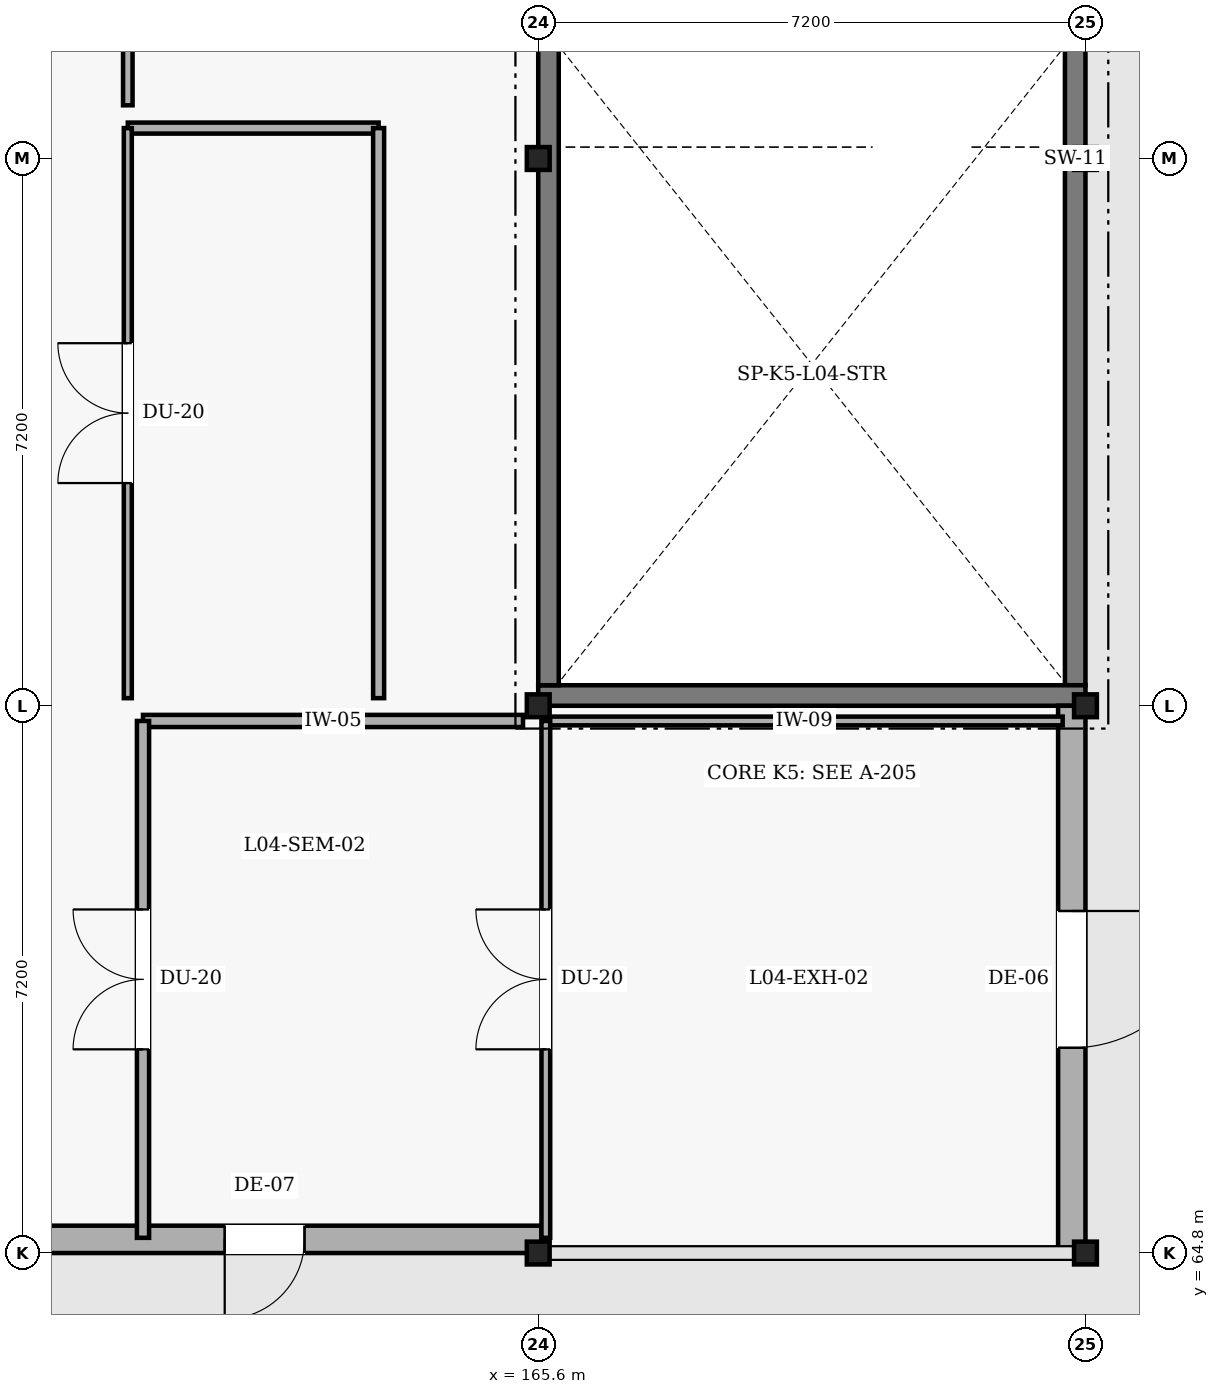
"""IFC4 building model, lengths in metres.
Left out: names, types, materials, properties, quantities, classifications, styles, units other than length and angle.
Written with IfcOpenShell. Run it as: python <this file> out.ifc"""

import sys

from ifc_helpers import new_model, si_unit, direction, frame, frame_2d, origin, origin_2d, place, context, subcontext, project, spatial, rectangle, i_section, extrude, element, fill, save


model = new_model("IFC4")
c1 = context("Model", 3, precision=1e-05, world=origin(), true_north=direction((0.0, 1.0)))
c2 = subcontext(c1, "Body", "Model", "MODEL_VIEW")
j1 = project(units=[si_unit("LENGTHUNIT", "METRE"), si_unit("PLANEANGLEUNIT", "RADIAN")], contexts=[c1])
p1 = place(None, origin())
s1 = spatial("IfcSite", under=j1, at=p1, CompositionType="ELEMENT")
p2 = place(p1, origin())
s2 = spatial("IfcBuilding", under=s1, at=p2, CompositionType="ELEMENT")
p3 = place(p2, frame((0.0, 0.0, 18.0)))
s3 = spatial("IfcBuildingStorey", under=s2, at=p3, CompositionType="ELEMENT", Elevation=18.0)
p4 = place(p3, frame((172.665, 86.13, 0.0), z_axis=(0.0, 0.0, 1.0), x_axis=(0.0, -1.0, 0.0)))
e1 = element("IfcWall", 1, at=p4, inside=s3, PredefinedType="SHEAR", context=c2, shape_type="SweptSolid", body=[
    extrude(rectangle(XDim=13.86, YDim=0.27, at=frame_2d((6.93, 0.0))), origin(), (0.0, 0.0, 1.0), 3.6),
])
p5 = place(p3, frame((172.8, 72.135, 0.0), z_axis=(0.0, 0.0, 1.0), x_axis=(-1.0, 0.0, 0.0)))
e2 = element("IfcWall", 2, at=p5, inside=s3, PredefinedType="SHEAR", context=c2, shape_type="SweptSolid", body=[
    extrude(rectangle(XDim=7.2, YDim=0.27, at=frame_2d((3.6, 0.0))), origin(), (0.0, 0.0, 1.0), 3.6),
])
p6 = place(p3, frame((165.735, 72.27, 0.0), z_axis=(0.0, 0.0, 1.0), x_axis=(0.0, 1.0, 0.0)))
e3 = element("IfcWall", 3, at=p6, inside=s3, PredefinedType="SHEAR", context=c2, shape_type="SweptSolid", body=[
    extrude(rectangle(XDim=13.86, YDim=0.27, at=frame_2d((6.93, 0.0))), origin(), (0.0, 0.0, 1.0), 3.6),
])
p7 = place(p6, frame((9.8, 0.0, 0.0)))
e4 = element("IfcOpeningElement", 4, at=p7, cuts=e3, PredefinedType="OPENING", context=c2, shape_type="SweptSolid", body=[
    extrude(rectangle(XDim=1.25, YDim=2.2, at=frame_2d((0.625, 1.1))), frame((0.0, 0.145, 0.0), z_axis=(0.0, -1.0, 0.0), x_axis=(1.0, 0.0, 0.0)), (0.0, 0.0, 1.0), 0.29),
])
for number, where, z_axis, x_axis in (
    (5, (165.6, 64.8, 0.0), (0.0, 0.0, 1.0), (1.0, 0.0, 0.0)),
    (6, (165.6, 72.0, 0.0), (0.0, 0.0, 1.0), (1.0, 0.0, 0.0)),
    (7, (165.6, 79.2, 0.0), (0.0, 0.0, 1.0), (1.0, 0.0, 0.0)),
    (8, (172.8, 64.8, 0.0), (0.0, 0.0, 1.0), (1.0, 0.0, 0.0)),
    (9, (172.8, 72.0, 0.0), (0.0, 0.0, 1.0), (1.0, 0.0, 0.0)),
    (10, (172.8, 79.2, 0.0), (0.0, 0.0, 1.0), (1.0, 0.0, 0.0)),
):
    element("IfcColumn", number, at=place(p3, frame(where, z_axis=z_axis, x_axis=x_axis)), inside=s3, PredefinedType="COLUMN", context=c2, shape_type="SweptSolid", body=[
        extrude(i_section(OverallWidth=0.3, OverallDepth=0.3, WebThickness=0.011, FlangeThickness=0.019, FilletRadius=0.027, at=origin_2d()), origin(), (0.0, 0.0, 1.0), 3.38),
    ])
p8 = place(p3, frame((172.62, 72.0, 0.0), z_axis=(0.0, 0.0, 1.0), x_axis=(0.0, -1.0, 0.0)))
e11 = element("IfcWall", 11, at=p8, inside=s3, PredefinedType="SOLIDWALL", context=c2, shape_type="SweptSolid", body=[
    extrude(rectangle(XDim=7.2, YDim=0.36, at=frame_2d((3.6, 0.0))), origin(), (0.0, 0.0, 1.0), 3.08),
])
p9 = place(p8, frame((2.7, 0.0, 0.0)))
e12 = element("IfcOpeningElement", 12, at=p9, cuts=e11, PredefinedType="OPENING", context=c2, shape_type="SweptSolid", body=[
    extrude(rectangle(XDim=1.8, YDim=2.25, at=frame_2d((0.9, 1.125))), frame((0.0, 0.19, 0.0), z_axis=(0.0, -1.0, 0.0), x_axis=(1.0, 0.0, 0.0)), (0.0, 0.0, 1.0), 0.38),
])
p10 = place(p3, frame((165.643, 64.98, 0.0), z_axis=(0.0, 0.0, 1.0), x_axis=(-1.0, 0.0, 0.0)))
e13 = element("IfcWall", 13, at=p10, inside=s3, PredefinedType="SOLIDWALL", context=c2, shape_type="SweptSolid", body=[
    extrude(rectangle(XDim=7.243, YDim=0.36, at=frame_2d((3.621, 0.0))), origin(), (0.0, 0.0, 1.0), 2.93),
])
p11 = place(p10, frame((3.117, 0.0, 0.0)))
e14 = element("IfcOpeningElement", 14, at=p11, cuts=e13, PredefinedType="OPENING", context=c2, shape_type="SweptSolid", body=[
    extrude(rectangle(XDim=1.05, YDim=2.2, at=frame_2d((0.525, 1.1))), frame((0.0, 0.19, 0.0), z_axis=(0.0, -1.0, 0.0), x_axis=(1.0, 0.0, 0.0)), (0.0, 0.0, 1.0), 0.38),
])
p12 = place(p3, frame((165.7, 71.8, 0.0), z_axis=(0.0, 0.0, 1.0), x_axis=(1.0, 0.0, 0.0)))
e15 = element("IfcWall", 15, at=p12, inside=s3, PredefinedType="PARTITIONING", context=c2, shape_type="SweptSolid", body=[
    extrude(rectangle(XDim=6.8, YDim=0.115, at=frame_2d((3.4, 0.0))), origin(), (0.0, 0.0, 1.0), 2.93),
])
p13 = place(p3, frame((165.7, 65.0, 0.0), z_axis=(0.0, 0.0, 1.0), x_axis=(0.0, 1.0, 0.0)))
e16 = element("IfcWall", 16, at=p13, inside=s3, PredefinedType="PARTITIONING", context=c2, shape_type="SweptSolid", body=[
    extrude(rectangle(XDim=6.8, YDim=0.115, at=frame_2d((3.4, 0.0))), origin(), (0.0, 0.0, 1.0), 2.98),
])
p14 = place(p13, frame((2.48, 0.0, 0.0)))
e17 = element("IfcOpeningElement", 17, at=p14, cuts=e16, PredefinedType="OPENING", context=c2, shape_type="SweptSolid", body=[
    extrude(rectangle(XDim=1.84, YDim=2.24, at=frame_2d((0.92, 1.12))), frame((0.0, 0.067, 0.0), z_axis=(0.0, -1.0, 0.0), x_axis=(1.0, 0.0, 0.0)), (0.0, 0.0, 1.0), 0.135),
])
p15 = place(p3, frame((160.4, 71.8, 0.0), z_axis=(0.0, 0.0, 1.0), x_axis=(1.0, 0.0, 0.0)))
e18 = element("IfcWall", 18, at=p15, inside=s3, PredefinedType="PARTITIONING", context=c2, shape_type="SweptSolid", body=[
    extrude(rectangle(XDim=5.0, YDim=0.16, at=frame_2d((2.5, 0.0))), origin(), (0.0, 0.0, 1.0), 2.93),
])
p16 = place(p3, frame((160.4, 65.0, 0.0), z_axis=(0.0, 0.0, 1.0), x_axis=(0.0, 1.0, 0.0)))
e19 = element("IfcWall", 19, at=p16, inside=s3, PredefinedType="PARTITIONING", context=c2, shape_type="SweptSolid", body=[
    extrude(rectangle(XDim=6.8, YDim=0.16, at=frame_2d((3.4, 0.0))), origin(), (0.0, 0.0, 1.0), 3.11),
])
p17 = place(p16, frame((2.48, 0.0, 0.0)))
e20 = element("IfcOpeningElement", 20, at=p17, cuts=e19, PredefinedType="OPENING", context=c2, shape_type="SweptSolid", body=[
    extrude(rectangle(XDim=1.84, YDim=2.24, at=frame_2d((0.92, 1.12))), frame((0.0, 0.09, 0.0), z_axis=(0.0, -1.0, 0.0), x_axis=(1.0, 0.0, 0.0)), (0.0, 0.0, 1.0), 0.18),
])
p18 = place(p3, frame((160.2, 79.6, 0.0), z_axis=(0.0, 0.0, 1.0), x_axis=(1.0, 0.0, 0.0)))
e21 = element("IfcWall", 21, at=p18, inside=s3, PredefinedType="PARTITIONING", context=c2, shape_type="SweptSolid", body=[
    extrude(rectangle(XDim=3.3, YDim=0.145, at=frame_2d((1.65, 0.0))), origin(), (0.0, 0.0, 1.0), 3.25),
])
p19 = place(p3, frame((163.5, 79.6, 0.0), z_axis=(0.0, 0.0, 1.0), x_axis=(0.0, -1.0, 0.0)))
e22 = element("IfcWall", 22, at=p19, inside=s3, PredefinedType="PARTITIONING", context=c2, shape_type="SweptSolid", body=[
    extrude(rectangle(XDim=7.5, YDim=0.145, at=frame_2d((3.75, 0.0))), origin(), (0.0, 0.0, 1.0), 2.93),
])
p20 = place(p3, frame((160.2, 72.1, 0.0), z_axis=(0.0, 0.0, 1.0), x_axis=(0.0, 1.0, 0.0)))
e23 = element("IfcWall", 23, at=p20, inside=s3, PredefinedType="PARTITIONING", context=c2, shape_type="SweptSolid", body=[
    extrude(rectangle(XDim=7.5, YDim=0.105, at=frame_2d((3.75, 0.0))), origin(), (0.0, 0.0, 1.0), 2.93),
])
p21 = place(p20, frame((2.83, 0.0, 0.0)))
e24 = element("IfcOpeningElement", 24, at=p21, cuts=e23, PredefinedType="OPENING", context=c2, shape_type="SweptSolid", body=[
    extrude(rectangle(XDim=1.84, YDim=2.24, at=frame_2d((0.92, 1.12))), frame((0.0, 0.062, 0.0), z_axis=(0.0, -1.0, 0.0), x_axis=(1.0, 0.0, 0.0)), (0.0, 0.0, 1.0), 0.125),
])
p22 = place(p3, frame((160.2, 79.9, 0.0), z_axis=(0.0, 0.0, 1.0), x_axis=(0.0, 1.0, 0.0)))
e25 = element("IfcWall", 25, at=p22, inside=s3, PredefinedType="PARTITIONING", context=c2, shape_type="SweptSolid", body=[
    extrude(rectangle(XDim=6.1, YDim=0.125, at=frame_2d((3.05, 0.0))), origin(), (0.0, 0.0, 1.0), 3.11),
])
p23 = place(p22, frame((2.525, 0.0, 0.0)))
e26 = element("IfcOpeningElement", 26, at=p23, cuts=e25, PredefinedType="OPENING", context=c2, shape_type="SweptSolid", body=[
    extrude(rectangle(XDim=1.05, YDim=2.1, at=frame_2d((0.525, 1.05))), frame((0.0, 0.073, 0.0), z_axis=(0.0, -1.0, 0.0), x_axis=(1.0, 0.0, 0.0)), (0.0, 0.0, 1.0), 0.145),
])
p24 = place(p9, origin())
e27 = element("IfcDoor", 27, at=p24, inside=s3, OperationType="SINGLE_SWING_LEFT", PredefinedType="DOOR", context=c2, shape_type="SweptSolid", body=[
    extrude(rectangle(XDim=1.8, YDim=2.25, at=frame_2d((0.9, 1.125))), frame((0.0, 0.025, 0.0), z_axis=(0.0, -1.0, 0.0), x_axis=(1.0, 0.0, 0.0)), (0.0, 0.0, 1.0), 0.05),
])
fill(e12, e27)
p25 = place(p11, origin())
e28 = element("IfcDoor", 28, at=p25, inside=s3, OperationType="SINGLE_SWING_RIGHT", PredefinedType="DOOR", context=c2, shape_type="SweptSolid", body=[
    extrude(rectangle(XDim=1.05, YDim=2.2, at=frame_2d((0.525, 1.1))), frame((0.0, 0.025, 0.0), z_axis=(0.0, -1.0, 0.0), x_axis=(1.0, 0.0, 0.0)), (0.0, 0.0, 1.0), 0.05),
])
fill(e14, e28)
p26 = place(p14, origin())
e29 = element("IfcDoor", 29, at=p26, inside=s3, OperationType="DOUBLE_DOOR_SINGLE_SWING", PredefinedType="DOOR", context=c2, shape_type="SweptSolid", body=[
    extrude(rectangle(XDim=1.84, YDim=2.24, at=frame_2d((0.92, 1.12))), frame((0.0, 0.025, 0.0), z_axis=(0.0, -1.0, 0.0), x_axis=(1.0, 0.0, 0.0)), (0.0, 0.0, 1.0), 0.05),
])
fill(e17, e29)
p27 = place(p17, origin())
e30 = element("IfcDoor", 30, at=p27, inside=s3, OperationType="DOUBLE_DOOR_SINGLE_SWING", PredefinedType="DOOR", context=c2, shape_type="SweptSolid", body=[
    extrude(rectangle(XDim=1.84, YDim=2.24, at=frame_2d((0.92, 1.12))), frame((0.0, 0.025, 0.0), z_axis=(0.0, -1.0, 0.0), x_axis=(1.0, 0.0, 0.0)), (0.0, 0.0, 1.0), 0.05),
])
fill(e20, e30)
p28 = place(p21, origin())
e31 = element("IfcDoor", 31, at=p28, inside=s3, OperationType="DOUBLE_DOOR_SINGLE_SWING", PredefinedType="DOOR", context=c2, shape_type="SweptSolid", body=[
    extrude(rectangle(XDim=1.84, YDim=2.24, at=frame_2d((0.92, 1.12))), frame((0.0, 0.025, 0.0), z_axis=(0.0, -1.0, 0.0), x_axis=(1.0, 0.0, 0.0)), (0.0, 0.0, 1.0), 0.05),
])
fill(e24, e31)
save(model, sys.argv[1])
